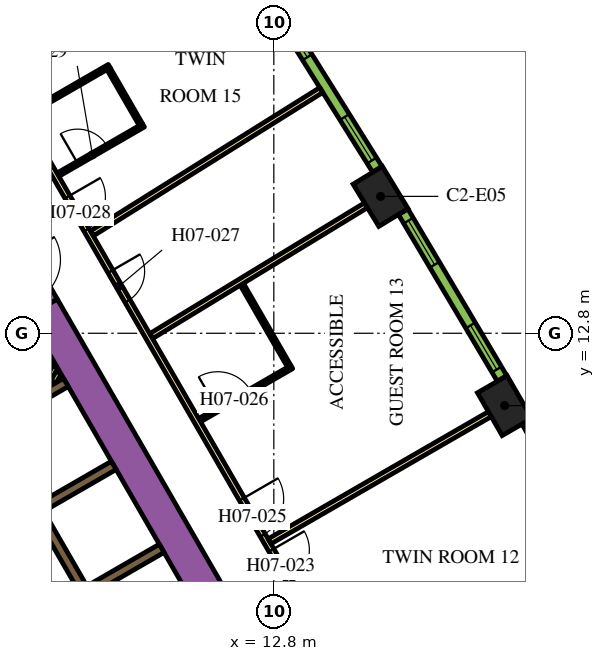
"""IFC4 building model, lengths in metres.
Left out: names, types, materials, properties, quantities, classifications, styles, units other than length and angle.
Written with IfcOpenShell. Run it as: python <this file> out.ifc"""

import sys

from ifc_helpers import new_model, si_unit, direction, frame, frame_2d, origin, origin_2d, place, context, subcontext, project, spatial, rectangle, extrude, element, fill, save


model = new_model("IFC4")
c1 = context("Model", 3, precision=1e-05, world=origin(), true_north=direction((0.0, 1.0)))
c2 = subcontext(c1, "Body", "Model", "MODEL_VIEW")
j1 = project(units=[si_unit("LENGTHUNIT", "METRE"), si_unit("PLANEANGLEUNIT", "RADIAN")], contexts=[c1])
p1 = place(None, origin())
s1 = spatial("IfcSite", under=j1, at=p1, CompositionType="ELEMENT")
p2 = place(p1, origin())
s2 = spatial("IfcBuilding", under=s1, at=p2, CompositionType="ELEMENT")
p3 = place(p2, frame((0.0, 0.0, 103.2)))
s3 = spatial("IfcBuildingStorey", under=s2, at=p3, CompositionType="ELEMENT", Elevation=103.2)
for number, where, z_axis, x_axis in (
    (1, (18.874, 10.897, 0.0), (0.0, 0.0, 1.0), (-0.5, 0.866, 0.0)),
    (2, (15.609, 16.402, 0.0), (0.0, 0.0, 1.0), (-0.52, 0.854, 0.0)),
):
    element("IfcColumn", number, at=place(p3, frame(where, z_axis=z_axis, x_axis=x_axis)), inside=s3, PredefinedType="COLUMN", context=c2, shape_type="SweptSolid", body=[
        extrude(rectangle(XDim=1.3, YDim=0.9, at=origin_2d()), origin(), (0.0, 0.0, 1.0), 3.9),
    ])
p4 = place(p3, frame((6.711, 13.476, 0.0), z_axis=(0.0, 0.0, 1.0), x_axis=(0.500002723396, -0.866023831425, 0.0)))
e3 = element("IfcWall", 3, at=p4, inside=s3, PredefinedType="SOLIDWALL", context=c2, shape_type="SweptSolid", body=[
    extrude(rectangle(XDim=20.334, YDim=0.9, at=frame_2d((10.167, 0.0))), origin(), (0.0, 0.0, 1.0), 3.9),
])
p5 = place(p3, frame((5.356, 10.367, 0.0), z_axis=(0.0, 0.0, 1.0), x_axis=(0.865978535641, 0.50008116922, 0.0)))
e4 = element("IfcWall", 4, at=p5, inside=s3, PredefinedType="SOLIDWALL", context=c2, shape_type="SweptSolid", body=[
    extrude(rectangle(XDim=2.278, YDim=0.25, at=frame_2d((1.139, 0.0))), origin(), (0.0, 0.0, 1.0), 3.9),
])
for number, where, z_axis, x_axis in (
    (5, (6.684, 8.224, 0.0), (0.0, 0.0, 1.0), (0.866, 0.5, 0.0)),
    (6, (7.944, 6.041, 0.0), (0.0, 0.0, 1.0), (0.866, 0.5, 0.0)),
):
    element("IfcWall", number, at=place(p3, frame(where, z_axis=z_axis, x_axis=x_axis)), inside=s3, PredefinedType="SOLIDWALL", context=c2, shape_type="SweptSolid", body=[
        extrude(rectangle(XDim=2.2, YDim=0.25, at=frame_2d((1.1, 0.0))), origin(), (0.0, 0.0, 1.0), 3.9),
    ])
p6 = place(p3, frame((6.482, 11.225, 0.0), z_axis=(0.0, 0.0, 1.0), x_axis=(0.5001061818, 0.865964091014, 0.0)))
e7 = element("IfcWall", 7, at=p6, inside=s3, PredefinedType="PARTITIONING", context=c2, shape_type="SweptSolid", body=[
    extrude(rectangle(XDim=0.973, YDim=0.15, at=frame_2d((0.486, 0.0))), origin(), (0.0, 0.0, 1.0), 2.75),
])
p7 = place(p3, frame((6.742, 11.375, 0.0), z_axis=(0.0, 0.0, 1.0), x_axis=(0.499744951064, 0.86617260629, 0.0)))
e8 = element("IfcWall", 8, at=p7, inside=s3, PredefinedType="PARTITIONING", context=c2, shape_type="SweptSolid", body=[
    extrude(rectangle(XDim=0.626, YDim=0.15, at=frame_2d((0.313, 0.0))), origin(), (0.0, 0.0, 1.0), 2.75),
])
p8 = place(p3, frame((7.001, 11.525, 0.0), z_axis=(0.0, 0.0, 1.0), x_axis=(0.499797962495, 0.866142018774, 0.0)))
e9 = element("IfcWall", 9, at=p8, inside=s3, PredefinedType="PARTITIONING", context=c2, shape_type="SweptSolid", body=[
    extrude(rectangle(XDim=0.28, YDim=0.15, at=frame_2d((0.14, 0.0))), origin(), (0.0, 0.0, 1.0), 2.75),
])
p9 = place(p3, frame((11.553, -0.46, 0.0), z_axis=(0.0, 0.0, 1.0), x_axis=(-0.500006514828, 0.866021642414, 0.0)))
e10 = element("IfcWall", 10, at=p9, inside=s3, PredefinedType="SOLIDWALL", context=c2, shape_type="SweptSolid", body=[
    extrude(rectangle(XDim=12.35, YDim=0.25, at=frame_2d((6.175, 0.0))), origin(), (0.0, 0.0, 1.0), 3.9),
])
p10 = place(p9, frame((0.585, 0.0, 0.0)))
e11 = element("IfcOpeningElement", 11, at=p10, cuts=e10, PredefinedType="OPENING", context=c2, shape_type="SweptSolid", body=[
    extrude(rectangle(XDim=1.1, YDim=2.1, at=frame_2d((0.55, 1.05))), frame((0.0, 0.135, 0.0), z_axis=(0.0, -1.0, 0.0), x_axis=(1.0, 0.0, 0.0)), (0.0, 0.0, 1.0), 0.27),
])
p11 = place(p9, frame((3.105, 0.0, 0.0)))
e12 = element("IfcOpeningElement", 12, at=p11, cuts=e10, PredefinedType="OPENING", context=c2, shape_type="SweptSolid", body=[
    extrude(rectangle(XDim=1.1, YDim=2.1, at=frame_2d((0.55, 1.05))), frame((0.0, 0.135, 0.0), z_axis=(0.0, -1.0, 0.0), x_axis=(1.0, 0.0, 0.0)), (0.0, 0.0, 1.0), 0.27),
])
p12 = place(p9, frame((5.625, 0.0, 0.0)))
e13 = element("IfcOpeningElement", 13, at=p12, cuts=e10, PredefinedType="OPENING", context=c2, shape_type="SweptSolid", body=[
    extrude(rectangle(XDim=1.1, YDim=2.1, at=frame_2d((0.55, 1.05))), frame((0.0, 0.135, 0.0), z_axis=(0.0, -1.0, 0.0), x_axis=(1.0, 0.0, 0.0)), (0.0, 0.0, 1.0), 0.27),
])
p13 = place(p3, frame((8.565, -2.185, 0.0), z_axis=(0.0, 0.0, 1.0), x_axis=(-0.499997954832, 0.866026584559, 0.0)))
e14 = element("IfcWall", 14, at=p13, inside=s3, PredefinedType="SOLIDWALL", context=c2, shape_type="SweptSolid", body=[
    extrude(rectangle(XDim=12.35, YDim=0.25, at=frame_2d((6.175, 0.0))), origin(), (0.0, 0.0, 1.0), 3.9),
])
p14 = place(p13, frame((5.725, 0.0, 0.0)))
e15 = element("IfcOpeningElement", 15, at=p14, cuts=e14, PredefinedType="OPENING", context=c2, shape_type="SweptSolid", body=[
    extrude(rectangle(XDim=0.9, YDim=2.1, at=frame_2d((0.45, 1.05))), frame((0.0, 0.135, 0.0), z_axis=(0.0, -1.0, 0.0), x_axis=(1.0, 0.0, 0.0)), (0.0, 0.0, 1.0), 0.27),
])
p15 = place(p3, frame((5.861, 14.948, 0.0), z_axis=(0.0, 0.0, 1.0), x_axis=(0.500062241894, -0.865989465428, 0.0)))
e16 = element("IfcWall", 16, at=p15, inside=s3, PredefinedType="SOLIDWALL", context=c2, shape_type="SweptSolid", body=[
    extrude(rectangle(XDim=1.7, YDim=0.9, at=frame_2d((0.85, 0.0))), origin(), (0.0, 0.0, 1.0), 3.9),
])
p16 = place(p15, frame((0.25, 0.0, 0.0)))
e17 = element("IfcOpeningElement", 17, at=p16, cuts=e16, PredefinedType="OPENING", context=c2, shape_type="SweptSolid", body=[
    extrude(rectangle(XDim=1.2, YDim=2.1, at=frame_2d((0.6, 1.05))), frame((0.0, 0.46, 0.0), z_axis=(0.0, -1.0, 0.0), x_axis=(1.0, 0.0, 0.0)), (0.0, 0.0, 1.0), 0.92),
])
p17 = place(p3, frame((6.163, 18.475, 0.0), z_axis=(0.0, 0.0, 1.0), x_axis=(0.500001317485, -0.866024643133, 0.0)))
e18 = element("IfcWall", 18, at=p17, inside=s3, PredefinedType="PARTITIONING", context=c2, shape_type="SweptSolid", body=[
    extrude(rectangle(XDim=25.767, YDim=0.15, at=frame_2d((12.883, 0.0))), origin(), (0.0, 0.0, 1.0), 2.75),
])
p18 = place(p17, frame((24.241, 0.0, 0.0)))
e19 = element("IfcOpeningElement", 19, at=p18, cuts=e18, PredefinedType="OPENING", context=c2, shape_type="SweptSolid", body=[
    extrude(rectangle(XDim=1.0, YDim=2.1, at=frame_2d((0.5, 1.05))), frame((0.0, 0.085, 0.0), z_axis=(0.0, -1.0, 0.0), x_axis=(1.0, 0.0, 0.0)), (0.0, 0.0, 1.0), 0.17),
])
p19 = place(p17, frame((13.144, 0.0, 0.0)))
e20 = element("IfcOpeningElement", 20, at=p19, cuts=e18, PredefinedType="OPENING", context=c2, shape_type="SweptSolid", body=[
    extrude(rectangle(XDim=1.0, YDim=2.1, at=frame_2d((0.5, 1.05))), frame((0.0, 0.085, 0.0), z_axis=(0.0, -1.0, 0.0), x_axis=(1.0, 0.0, 0.0)), (0.0, 0.0, 1.0), 0.17),
])
p20 = place(p17, frame((11.592, 0.0, 0.0)))
e21 = element("IfcOpeningElement", 21, at=p20, cuts=e18, PredefinedType="OPENING", context=c2, shape_type="SweptSolid", body=[
    extrude(rectangle(XDim=1.1, YDim=2.1, at=frame_2d((0.55, 1.05))), frame((0.0, 0.085, 0.0), z_axis=(0.0, -1.0, 0.0), x_axis=(1.0, 0.0, 0.0)), (0.0, 0.0, 1.0), 0.17),
])
p21 = place(p17, frame((4.674, 0.0, 0.0)))
e22 = element("IfcOpeningElement", 22, at=p21, cuts=e18, PredefinedType="OPENING", context=c2, shape_type="SweptSolid", body=[
    extrude(rectangle(XDim=0.9, YDim=2.1, at=frame_2d((0.45, 1.05))), frame((0.0, 0.085, 0.0), z_axis=(0.0, -1.0, 0.0), x_axis=(1.0, 0.0, 0.0)), (0.0, 0.0, 1.0), 0.17),
])
p22 = place(p17, frame((2.411, 0.0, 0.0)))
e23 = element("IfcOpeningElement", 23, at=p22, cuts=e18, PredefinedType="OPENING", context=c2, shape_type="SweptSolid", body=[
    extrude(rectangle(XDim=1.0, YDim=2.1, at=frame_2d((0.5, 1.05))), frame((0.0, 0.085, 0.0), z_axis=(0.0, -1.0, 0.0), x_axis=(1.0, 0.0, 0.0)), (0.0, 0.0, 1.0), 0.17),
])
p23 = place(p3, frame((10.592, 24.589, 0.0), z_axis=(0.0, 0.0, 1.0), x_axis=(-0.835337323748, -0.549737715236, 0.0)))
e24 = element("IfcWall", 24, at=p23, inside=s3, PredefinedType="PARTITIONING", context=c2, shape_type="SweptSolid", body=[
    extrude(rectangle(XDim=10.875, YDim=0.15, at=frame_2d((5.438, 0.0))), origin(), (0.0, 0.0, 1.0), 2.75),
])
p24 = place(p3, frame((14.049, 19.2, 0.0), z_axis=(0.0, 0.0, 1.0), x_axis=(-0.847955867271, -0.530066832731, 0.0)))
e25 = element("IfcWall", 25, at=p24, inside=s3, PredefinedType="PARTITIONING", context=c2, shape_type="SweptSolid", body=[
    extrude(rectangle(XDim=7.111, YDim=0.15, at=frame_2d((3.556, 0.0))), origin(), (0.0, 0.0, 1.0), 2.75),
])
p25 = place(p3, frame((15.225, 16.167, 0.0), z_axis=(0.0, 0.0, 1.0), x_axis=(-0.854088713274, -0.520127359266, 0.0)))
e26 = element("IfcWall", 26, at=p25, inside=s3, PredefinedType="PARTITIONING", context=c2, shape_type="SweptSolid", body=[
    extrude(rectangle(XDim=6.611, YDim=0.15, at=frame_2d((3.305, 0.0))), origin(), (0.0, 0.0, 1.0), 2.75),
])
p26 = place(p3, frame((18.484, 10.672, 0.0), z_axis=(0.0, 0.0, 1.0), x_axis=(-0.866019162053, -0.50001081084, 0.0)))
e27 = element("IfcWall", 27, at=p26, inside=s3, PredefinedType="PARTITIONING", context=c2, shape_type="SweptSolid", body=[
    extrude(rectangle(XDim=6.694, YDim=0.15, at=frame_2d((3.347, 0.0))), origin(), (0.0, 0.0, 1.0), 2.75),
])
p27 = place(p3, frame((10.847, 10.513, 0.0), z_axis=(0.0, 0.0, 1.0), x_axis=(0.865996816683, 0.500049511043, 0.0)))
e28 = element("IfcWall", 28, at=p27, inside=s3, PredefinedType="PARTITIONING", context=c2, shape_type="SweptSolid", body=[
    extrude(rectangle(XDim=2.8, YDim=0.1, at=frame_2d((1.4, 0.0))), origin(), (0.0, 0.0, 1.0), 2.75),
])
p28 = place(p27, frame((0.55, 0.0, 0.0)))
e29 = element("IfcOpeningElement", 29, at=p28, cuts=e28, PredefinedType="OPENING", context=c2, shape_type="SweptSolid", body=[
    extrude(rectangle(XDim=1.0, YDim=2.1, at=frame_2d((0.5, 1.05))), frame((0.0, 0.06, 0.0), z_axis=(0.0, -1.0, 0.0), x_axis=(1.0, 0.0, 0.0)), (0.0, 0.0, 1.0), 0.12),
])
p29 = place(p3, frame((13.203, 11.931, 0.0), z_axis=(0.0, 0.0, 1.0), x_axis=(-0.499988411372, 0.866032094379, 0.0)))
e30 = element("IfcWall", 30, at=p29, inside=s3, PredefinedType="PARTITIONING", context=c2, shape_type="SweptSolid", body=[
    extrude(rectangle(XDim=2.49, YDim=0.1, at=frame_2d((1.245, 0.0))), origin(), (0.0, 0.0, 1.0), 2.75),
])
p30 = place(p3, frame((7.118, 16.971, 0.0), z_axis=(0.0, 0.0, 1.0), x_axis=(0.866021400173, 0.500006934395, 0.0)))
e31 = element("IfcWall", 31, at=p30, inside=s3, PredefinedType="PARTITIONING", context=c2, shape_type="SweptSolid", body=[
    extrude(rectangle(XDim=2.6, YDim=0.1, at=frame_2d((1.3, 0.0))), origin(), (0.0, 0.0, 1.0), 2.75),
])
p31 = place(p30, frame((0.6, 0.0, 0.0)))
e32 = element("IfcOpeningElement", 32, at=p31, cuts=e31, PredefinedType="OPENING", context=c2, shape_type="SweptSolid", body=[
    extrude(rectangle(XDim=0.9, YDim=2.1, at=frame_2d((0.45, 1.05))), frame((0.0, 0.06, 0.0), z_axis=(0.0, -1.0, 0.0), x_axis=(1.0, 0.0, 0.0)), (0.0, 0.0, 1.0), 0.12),
])
p32 = place(p3, frame((9.302, 18.289, 0.0), z_axis=(0.0, 0.0, 1.0), x_axis=(-0.500062241894, 0.865989465428, 0.0)))
e33 = element("IfcWall", 33, at=p32, inside=s3, PredefinedType="PARTITIONING", context=c2, shape_type="SweptSolid", body=[
    extrude(rectangle(XDim=1.7, YDim=0.1, at=frame_2d((0.85, 0.0))), origin(), (0.0, 0.0, 1.0), 2.75),
])
p33 = place(p3, frame((6.218, 18.53, 0.0), z_axis=(0.0, 0.0, 1.0), x_axis=(0.865997922154, 0.500047596559, 0.0)))
e34 = element("IfcWall", 34, at=p33, inside=s3, PredefinedType="PARTITIONING", context=c2, shape_type="SweptSolid", body=[
    extrude(rectangle(XDim=2.6, YDim=0.1, at=frame_2d((1.3, 0.0))), origin(), (0.0, 0.0, 1.0), 2.75),
])
p34 = place(p3, frame((21.956, 6.033, 0.0), z_axis=(0.0, 0.0, 1.0), x_axis=(-0.48983164787, 0.87181704316, 0.0)))
e35 = element("IfcWall", 35, at=p34, inside=s3, PredefinedType="SOLIDWALL", context=c2, shape_type="SweptSolid", body=[
    extrude(rectangle(XDim=5.1, YDim=0.29, at=frame_2d((2.55, 0.0))), origin(), (0.0, 0.0, 1.0), 3.65),
])
p35 = place(p34, frame((0.273, 0.0, 0.9)))
e36 = element("IfcOpeningElement", 36, at=p35, cuts=e35, PredefinedType="OPENING", context=c2, shape_type="SweptSolid", body=[
    extrude(rectangle(XDim=1.35, YDim=2.15, at=frame_2d((0.675, 1.075))), frame((0.0, 0.155, 0.0), z_axis=(0.0, -1.0, 0.0), x_axis=(1.0, 0.0, 0.0)), (0.0, 0.0, 1.0), 0.31),
])
p36 = place(p34, frame((3.478, 0.0, 0.9)))
e37 = element("IfcOpeningElement", 37, at=p36, cuts=e35, PredefinedType="OPENING", context=c2, shape_type="SweptSolid", body=[
    extrude(rectangle(XDim=1.35, YDim=2.15, at=frame_2d((0.675, 1.075))), frame((0.0, 0.155, 0.0), z_axis=(0.0, -1.0, 0.0), x_axis=(1.0, 0.0, 0.0)), (0.0, 0.0, 1.0), 0.31),
])
p37 = place(p3, frame((18.805, 11.611, 0.0), z_axis=(0.0, 0.0, 1.0), x_axis=(-0.510054281659, 0.860142214847, 0.0)))
e38 = element("IfcWall", 38, at=p37, inside=s3, PredefinedType="SOLIDWALL", context=c2, shape_type="SweptSolid", body=[
    extrude(rectangle(XDim=5.101, YDim=0.29, at=frame_2d((2.55, 0.0))), origin(), (0.0, 0.0, 1.0), 3.65),
])
p38 = place(p37, frame((0.273, 0.0, 0.9)))
e39 = element("IfcOpeningElement", 39, at=p38, cuts=e38, PredefinedType="OPENING", context=c2, shape_type="SweptSolid", body=[
    extrude(rectangle(XDim=1.35, YDim=2.15, at=frame_2d((0.675, 1.075))), frame((0.0, 0.155, 0.0), z_axis=(0.0, -1.0, 0.0), x_axis=(1.0, 0.0, 0.0)), (0.0, 0.0, 1.0), 0.31),
])
p39 = place(p37, frame((3.478, 0.0, 0.9)))
e40 = element("IfcOpeningElement", 40, at=p39, cuts=e38, PredefinedType="OPENING", context=c2, shape_type="SweptSolid", body=[
    extrude(rectangle(XDim=1.35, YDim=2.15, at=frame_2d((0.675, 1.075))), frame((0.0, 0.155, 0.0), z_axis=(0.0, -1.0, 0.0), x_axis=(1.0, 0.0, 0.0)), (0.0, 0.0, 1.0), 0.31),
])
p40 = place(p3, frame((15.524, 17.114, 0.0), z_axis=(0.0, 0.0, 1.0), x_axis=(-0.530072082134, 0.847952585787, 0.0)))
e41 = element("IfcWall", 41, at=p40, inside=s3, PredefinedType="SOLIDWALL", context=c2, shape_type="SweptSolid", body=[
    extrude(rectangle(XDim=5.1, YDim=0.29, at=frame_2d((2.55, 0.0))), origin(), (0.0, 0.0, 1.0), 3.65),
])
p41 = place(p40, frame((0.273, 0.0, 0.9)))
e42 = element("IfcOpeningElement", 42, at=p41, cuts=e41, PredefinedType="OPENING", context=c2, shape_type="SweptSolid", body=[
    extrude(rectangle(XDim=1.35, YDim=2.15, at=frame_2d((0.675, 1.075))), frame((0.0, 0.155, 0.0), z_axis=(0.0, -1.0, 0.0), x_axis=(1.0, 0.0, 0.0)), (0.0, 0.0, 1.0), 0.31),
])
p42 = place(p40, frame((3.478, 0.0, 0.9)))
e43 = element("IfcOpeningElement", 43, at=p42, cuts=e41, PredefinedType="OPENING", context=c2, shape_type="SweptSolid", body=[
    extrude(rectangle(XDim=1.35, YDim=2.15, at=frame_2d((0.675, 1.075))), frame((0.0, 0.155, 0.0), z_axis=(0.0, -1.0, 0.0), x_axis=(1.0, 0.0, 0.0)), (0.0, 0.0, 1.0), 0.31),
])
p43 = place(p19, origin())
e44 = element("IfcDoor", 44, at=p43, inside=s3, OperationType="SINGLE_SWING_LEFT", PredefinedType="DOOR", context=c2, shape_type="SweptSolid", body=[
    extrude(rectangle(XDim=1.0, YDim=2.1, at=frame_2d((0.5, 1.05))), frame((0.0, 0.025, 0.0), z_axis=(0.0, -1.0, 0.0), x_axis=(1.0, 0.0, 0.0)), (0.0, 0.0, 1.0), 0.05),
])
fill(e20, e44)
p44 = place(p20, origin())
e45 = element("IfcDoor", 45, at=p44, inside=s3, OperationType="SINGLE_SWING_RIGHT", PredefinedType="DOOR", context=c2, shape_type="SweptSolid", body=[
    extrude(rectangle(XDim=1.1, YDim=2.1, at=frame_2d((0.55, 1.05))), frame((0.0, 0.025, 0.0), z_axis=(0.0, -1.0, 0.0), x_axis=(1.0, 0.0, 0.0)), (0.0, 0.0, 1.0), 0.05),
])
fill(e21, e45)
p45 = place(p28, origin())
e46 = element("IfcDoor", 46, at=p45, inside=s3, OperationType="SINGLE_SWING_LEFT", PredefinedType="DOOR", context=c2, shape_type="SweptSolid", body=[
    extrude(rectangle(XDim=1.0, YDim=2.1, at=frame_2d((0.5, 1.05))), frame((0.0, 0.025, 0.0), z_axis=(0.0, -1.0, 0.0), x_axis=(1.0, 0.0, 0.0)), (0.0, 0.0, 1.0), 0.05),
])
fill(e29, e46)
p46 = place(p21, origin())
e47 = element("IfcDoor", 47, at=p46, inside=s3, OperationType="SINGLE_SWING_RIGHT", PredefinedType="DOOR", context=c2, shape_type="SweptSolid", body=[
    extrude(rectangle(XDim=0.9, YDim=2.1, at=frame_2d((0.45, 1.05))), frame((0.0, 0.025, 0.0), z_axis=(0.0, -1.0, 0.0), x_axis=(1.0, 0.0, 0.0)), (0.0, 0.0, 1.0), 0.05),
])
fill(e22, e47)
p47 = place(p22, origin())
e48 = element("IfcDoor", 48, at=p47, inside=s3, OperationType="SINGLE_SWING_RIGHT", PredefinedType="DOOR", context=c2, shape_type="SweptSolid", body=[
    extrude(rectangle(XDim=1.0, YDim=2.1, at=frame_2d((0.5, 1.05))), frame((0.0, 0.025, 0.0), z_axis=(0.0, -1.0, 0.0), x_axis=(1.0, 0.0, 0.0)), (0.0, 0.0, 1.0), 0.05),
])
fill(e23, e48)
p48 = place(p31, origin())
e49 = element("IfcDoor", 49, at=p48, inside=s3, OperationType="SINGLE_SWING_RIGHT", PredefinedType="DOOR", context=c2, shape_type="SweptSolid", body=[
    extrude(rectangle(XDim=0.9, YDim=2.1, at=frame_2d((0.45, 1.05))), frame((0.0, 0.025, 0.0), z_axis=(0.0, -1.0, 0.0), x_axis=(1.0, 0.0, 0.0)), (0.0, 0.0, 1.0), 0.05),
])
fill(e32, e49)
p49 = place(p38, origin())
e50 = element("IfcWindow", 50, at=p49, inside=s3, PartitioningType="DOUBLE_PANEL_VERTICAL", PredefinedType="WINDOW", context=c2, shape_type="SweptSolid", body=[
    extrude(rectangle(XDim=1.35, YDim=2.15, at=frame_2d((0.675, 1.075))), frame((0.0, 0.015, 0.0), z_axis=(0.0, -1.0, 0.0), x_axis=(1.0, 0.0, 0.0)), (0.0, 0.0, 1.0), 0.06),
])
fill(e39, e50)
p50 = place(p39, origin())
e51 = element("IfcWindow", 51, at=p50, inside=s3, PartitioningType="DOUBLE_PANEL_VERTICAL", PredefinedType="WINDOW", context=c2, shape_type="SweptSolid", body=[
    extrude(rectangle(XDim=1.35, YDim=2.15, at=frame_2d((0.675, 1.075))), frame((0.0, 0.015, 0.0), z_axis=(0.0, -1.0, 0.0), x_axis=(1.0, 0.0, 0.0)), (0.0, 0.0, 1.0), 0.06),
])
fill(e40, e51)
p51 = place(p41, origin())
e52 = element("IfcWindow", 52, at=p51, inside=s3, PartitioningType="DOUBLE_PANEL_VERTICAL", PredefinedType="WINDOW", context=c2, shape_type="SweptSolid", body=[
    extrude(rectangle(XDim=1.35, YDim=2.15, at=frame_2d((0.675, 1.075))), frame((0.0, 0.015, 0.0), z_axis=(0.0, -1.0, 0.0), x_axis=(1.0, 0.0, 0.0)), (0.0, 0.0, 1.0), 0.06),
])
fill(e42, e52)
p52 = place(p42, origin())
e53 = element("IfcWindow", 53, at=p52, inside=s3, PartitioningType="DOUBLE_PANEL_VERTICAL", PredefinedType="WINDOW", context=c2, shape_type="SweptSolid", body=[
    extrude(rectangle(XDim=1.35, YDim=2.15, at=frame_2d((0.675, 1.075))), frame((0.0, 0.015, 0.0), z_axis=(0.0, -1.0, 0.0), x_axis=(1.0, 0.0, 0.0)), (0.0, 0.0, 1.0), 0.06),
])
fill(e43, e53)
save(model, sys.argv[1])
